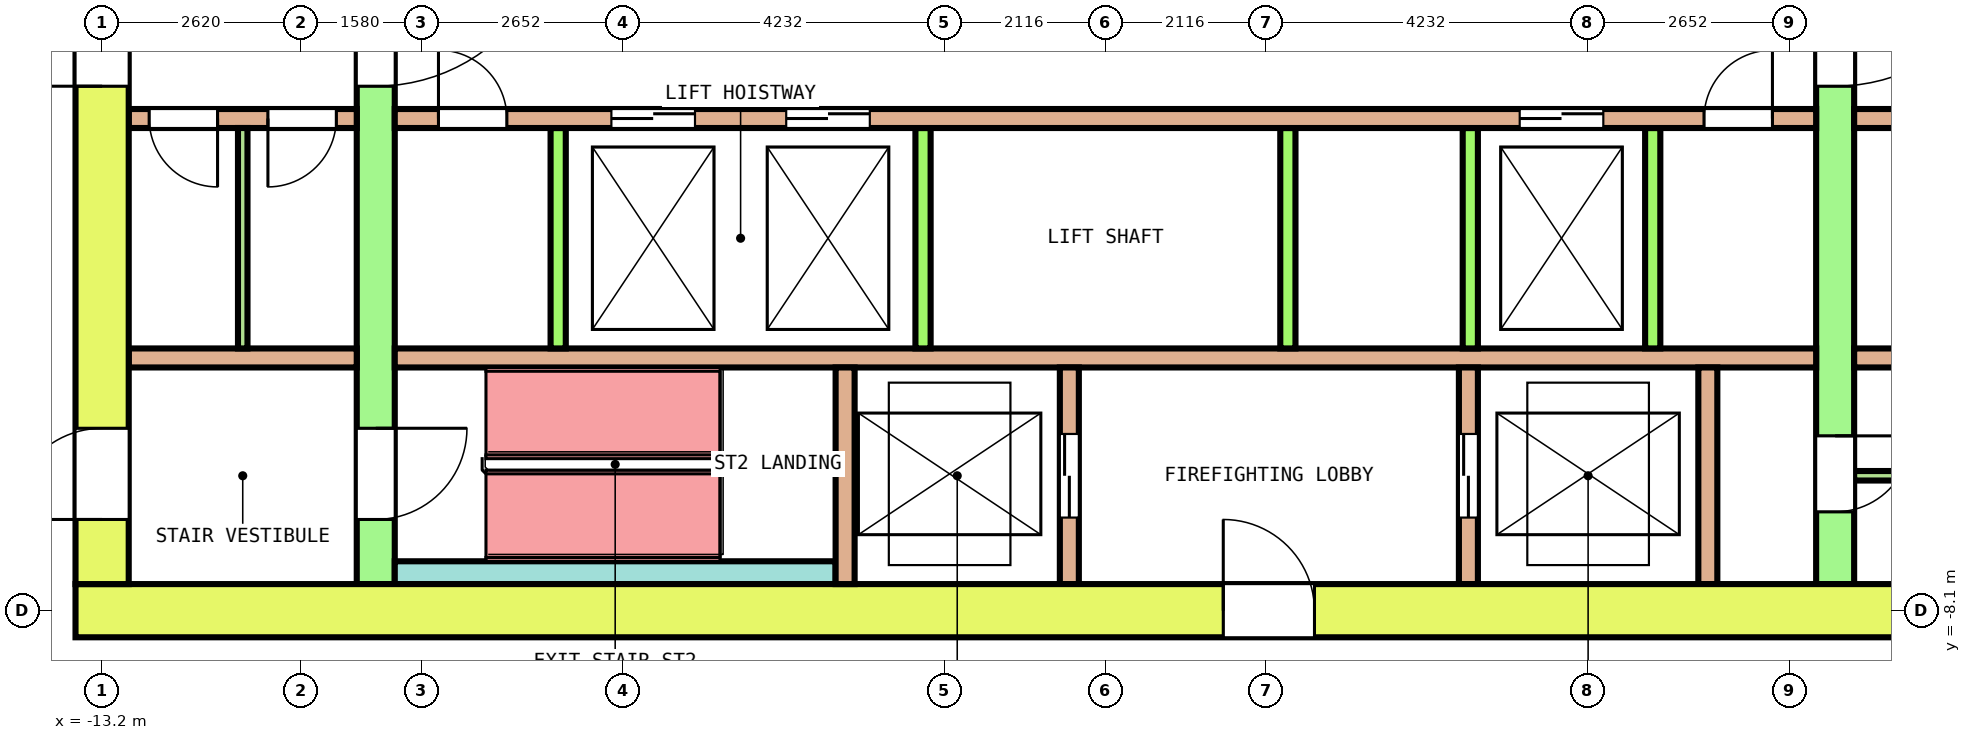
"""IFC4 building model, lengths in metres.
Left out: names, types, materials, properties, quantities, classifications, styles, units other than length and angle.
Written with IfcOpenShell. Run it as: python <this file> out.ifc"""

import sys

from ifc_helpers import new_model, si_unit, direction, frame, frame_2d, origin, place, context, subcontext, project, spatial, rectangle, extrude, element, fill, save


model = new_model("IFC4")
c1 = context("Model", 3, precision=1e-05, world=origin(), true_north=direction((0.0, 1.0)))
c2 = subcontext(c1, "Body", "Model", "MODEL_VIEW")
j1 = project(units=[si_unit("LENGTHUNIT", "METRE"), si_unit("PLANEANGLEUNIT", "RADIAN")], contexts=[c1])
p1 = place(None, origin())
s1 = spatial("IfcSite", under=j1, at=p1, CompositionType="ELEMENT")
p2 = place(p1, origin())
s2 = spatial("IfcBuilding", under=s1, at=p2, CompositionType="ELEMENT")
p3 = place(p2, frame((0.0, 0.0, 145.2)))
s3 = spatial("IfcBuildingStorey", under=s2, at=p3, CompositionType="ELEMENT", Elevation=145.2)
p4 = place(p3, frame((-13.55, -8.1, 0.0), z_axis=(0.0, 0.0, 1.0), x_axis=(1.0, 0.0, 0.0)))
e1 = element("IfcWall", 1, at=p4, inside=s3, PredefinedType="SHEAR", context=c2, shape_type="SweptSolid", body=[
    extrude(rectangle(XDim=27.1, YDim=0.7, at=frame_2d((13.55, 0.0))), origin(), (0.0, 0.0, 1.0), 4.1),
])
p5 = place(p4, frame((15.1, 0.0, 0.0)))
e2 = element("IfcOpeningElement", 2, at=p5, cuts=e1, PredefinedType="OPENING", context=c2, shape_type="SweptSolid", body=[
    extrude(rectangle(XDim=1.2, YDim=2.1, at=frame_2d((0.6, 1.05))), frame((0.0, 0.36, 0.0), z_axis=(0.0, -1.0, 0.0), x_axis=(1.0, 0.0, 0.0)), (0.0, 0.0, 1.0), 0.72),
])
p6 = place(p3, frame((-13.2, -7.75, 0.0), z_axis=(0.0, 0.0, 1.0), x_axis=(0.0, 1.0, 0.0)))
e3 = element("IfcWall", 3, at=p6, inside=s3, PredefinedType="SHEAR", context=c2, shape_type="SweptSolid", body=[
    extrude(rectangle(XDim=15.5, YDim=0.7, at=frame_2d((7.75, 0.0))), origin(), (0.0, 0.0, 1.0), 4.1),
])
p7 = place(p6, frame((6.55, 0.0, 0.0)))
e4 = element("IfcOpeningElement", 4, at=p7, cuts=e3, PredefinedType="OPENING", context=c2, shape_type="SweptSolid", body=[
    extrude(rectangle(XDim=2.4, YDim=2.1, at=frame_2d((1.2, 1.05))), frame((0.0, 0.36, 0.0), z_axis=(0.0, -1.0, 0.0), x_axis=(1.0, 0.0, 0.0)), (0.0, 0.0, 1.0), 0.72),
])
p8 = place(p6, frame((13.45, 0.0, 0.0)))
e5 = element("IfcOpeningElement", 5, at=p8, cuts=e3, PredefinedType="OPENING", context=c2, shape_type="SweptSolid", body=[
    extrude(rectangle(XDim=1.2, YDim=2.1, at=frame_2d((0.6, 1.05))), frame((0.0, 0.36, 0.0), z_axis=(0.0, -1.0, 0.0), x_axis=(1.0, 0.0, 0.0)), (0.0, 0.0, 1.0), 0.72),
])
p9 = place(p6, frame((0.85, 0.0, 0.0)))
e6 = element("IfcOpeningElement", 6, at=p9, cuts=e3, PredefinedType="OPENING", context=c2, shape_type="SweptSolid", body=[
    extrude(rectangle(XDim=1.2, YDim=2.1, at=frame_2d((0.6, 1.05))), frame((0.0, 0.36, 0.0), z_axis=(0.0, -1.0, 0.0), x_axis=(1.0, 0.0, 0.0)), (0.0, 0.0, 1.0), 0.72),
])
p10 = place(p3, frame((-9.6, -7.75, 0.0), z_axis=(0.0, 0.0, 1.0), x_axis=(0.0, 1.0, 0.0)))
e7 = element("IfcWall", 7, at=p10, inside=s3, PredefinedType="SHEAR", context=c2, shape_type="SweptSolid", body=[
    extrude(rectangle(XDim=15.5, YDim=0.5, at=frame_2d((7.75, 0.0))), origin(), (0.0, 0.0, 1.0), 4.1),
])
p11 = place(p10, frame((6.55, 0.0, 0.0)))
e8 = element("IfcOpeningElement", 8, at=p11, cuts=e7, PredefinedType="OPENING", context=c2, shape_type="SweptSolid", body=[
    extrude(rectangle(XDim=2.4, YDim=2.1, at=frame_2d((1.2, 1.05))), frame((0.0, 0.26, 0.0), z_axis=(0.0, -1.0, 0.0), x_axis=(1.0, 0.0, 0.0)), (0.0, 0.0, 1.0), 0.52),
])
p12 = place(p10, frame((13.45, 0.0, 0.0)))
e9 = element("IfcOpeningElement", 9, at=p12, cuts=e7, PredefinedType="OPENING", context=c2, shape_type="SweptSolid", body=[
    extrude(rectangle(XDim=1.2, YDim=2.1, at=frame_2d((0.6, 1.05))), frame((0.0, 0.26, 0.0), z_axis=(0.0, -1.0, 0.0), x_axis=(1.0, 0.0, 0.0)), (0.0, 0.0, 1.0), 0.52),
])
p13 = place(p10, frame((0.85, 0.0, 0.0)))
e10 = element("IfcOpeningElement", 10, at=p13, cuts=e7, PredefinedType="OPENING", context=c2, shape_type="SweptSolid", body=[
    extrude(rectangle(XDim=1.2, YDim=2.1, at=frame_2d((0.6, 1.05))), frame((0.0, 0.26, 0.0), z_axis=(0.0, -1.0, 0.0), x_axis=(1.0, 0.0, 0.0)), (0.0, 0.0, 1.0), 0.52),
])
p14 = place(p3, frame((9.6, -7.75, 0.0), z_axis=(0.0, 0.0, 1.0), x_axis=(0.0, 1.0, 0.0)))
e11 = element("IfcWall", 11, at=p14, inside=s3, PredefinedType="SHEAR", context=c2, shape_type="SweptSolid", body=[
    extrude(rectangle(XDim=15.5, YDim=0.5, at=frame_2d((7.75, 0.0))), origin(), (0.0, 0.0, 1.0), 4.1),
])
p15 = place(p14, frame((6.55, 0.0, 0.0)))
e12 = element("IfcOpeningElement", 12, at=p15, cuts=e11, PredefinedType="OPENING", context=c2, shape_type="SweptSolid", body=[
    extrude(rectangle(XDim=2.4, YDim=2.1, at=frame_2d((1.2, 1.05))), frame((0.0, 0.26, 0.0), z_axis=(0.0, -1.0, 0.0), x_axis=(1.0, 0.0, 0.0)), (0.0, 0.0, 1.0), 0.52),
])
p16 = place(p14, frame((13.45, 0.0, 0.0)))
e13 = element("IfcOpeningElement", 13, at=p16, cuts=e11, PredefinedType="OPENING", context=c2, shape_type="SweptSolid", body=[
    extrude(rectangle(XDim=1.2, YDim=2.1, at=frame_2d((0.6, 1.05))), frame((0.0, 0.26, 0.0), z_axis=(0.0, -1.0, 0.0), x_axis=(1.0, 0.0, 0.0)), (0.0, 0.0, 1.0), 0.52),
])
p17 = place(p14, frame((0.95, 0.0, 0.0)))
e14 = element("IfcOpeningElement", 14, at=p17, cuts=e11, PredefinedType="OPENING", context=c2, shape_type="SweptSolid", body=[
    extrude(rectangle(XDim=1.0, YDim=2.1, at=frame_2d((0.5, 1.05))), frame((0.0, 0.26, 0.0), z_axis=(0.0, -1.0, 0.0), x_axis=(1.0, 0.0, 0.0)), (0.0, 0.0, 1.0), 0.52),
])
p18 = place(p3, frame((-12.85, -1.625, 0.0), z_axis=(0.0, 0.0, 1.0), x_axis=(1.0, 0.0, 0.0)))
e15 = element("IfcWall", 15, at=p18, inside=s3, PredefinedType="SOLIDWALL", context=c2, shape_type="SweptSolid", body=[
    extrude(rectangle(XDim=3.0, YDim=0.25, at=frame_2d((1.5, 0.0))), origin(), (0.0, 0.0, 1.0), 4.1),
])
p19 = place(p18, frame((0.269, 0.0, 0.0)))
e16 = element("IfcOpeningElement", 16, at=p19, cuts=e15, PredefinedType="OPENING", context=c2, shape_type="SweptSolid", body=[
    extrude(rectangle(XDim=0.9, YDim=2.1, at=frame_2d((0.45, 1.05))), frame((0.0, 0.135, 0.0), z_axis=(0.0, -1.0, 0.0), x_axis=(1.0, 0.0, 0.0)), (0.0, 0.0, 1.0), 0.27),
])
p20 = place(p18, frame((1.831, 0.0, 0.0)))
e17 = element("IfcOpeningElement", 17, at=p20, cuts=e15, PredefinedType="OPENING", context=c2, shape_type="SweptSolid", body=[
    extrude(rectangle(XDim=0.9, YDim=2.1, at=frame_2d((0.45, 1.05))), frame((0.0, 0.135, 0.0), z_axis=(0.0, -1.0, 0.0), x_axis=(1.0, 0.0, 0.0)), (0.0, 0.0, 1.0), 0.27),
])
p21 = place(p3, frame((-9.35, -1.625, 0.0), z_axis=(0.0, 0.0, 1.0), x_axis=(1.0, 0.0, 0.0)))
e18 = element("IfcWall", 18, at=p21, inside=s3, PredefinedType="SOLIDWALL", context=c2, shape_type="SweptSolid", body=[
    extrude(rectangle(XDim=18.7, YDim=0.25, at=frame_2d((9.35, 0.0))), origin(), (0.0, 0.0, 1.0), 4.1),
])
p22 = place(p21, frame((2.85, 0.0, 0.0)))
e19 = element("IfcOpeningElement", 19, at=p22, cuts=e18, PredefinedType="OPENING", context=c2, shape_type="SweptSolid", body=[
    extrude(rectangle(XDim=1.1, YDim=2.1, at=frame_2d((0.55, 1.05))), frame((0.0, 0.135, 0.0), z_axis=(0.0, -1.0, 0.0), x_axis=(1.0, 0.0, 0.0)), (0.0, 0.0, 1.0), 0.27),
])
p23 = place(p21, frame((5.15, 0.0, 0.0)))
e20 = element("IfcOpeningElement", 20, at=p23, cuts=e18, PredefinedType="OPENING", context=c2, shape_type="SweptSolid", body=[
    extrude(rectangle(XDim=1.1, YDim=2.1, at=frame_2d((0.55, 1.05))), frame((0.0, 0.135, 0.0), z_axis=(0.0, -1.0, 0.0), x_axis=(1.0, 0.0, 0.0)), (0.0, 0.0, 1.0), 0.27),
])
p24 = place(p21, frame((14.8, 0.0, 0.0)))
e21 = element("IfcOpeningElement", 21, at=p24, cuts=e18, PredefinedType="OPENING", context=c2, shape_type="SweptSolid", body=[
    extrude(rectangle(XDim=1.1, YDim=2.1, at=frame_2d((0.55, 1.05))), frame((0.0, 0.135, 0.0), z_axis=(0.0, -1.0, 0.0), x_axis=(1.0, 0.0, 0.0)), (0.0, 0.0, 1.0), 0.27),
])
p25 = place(p21, frame((0.575, 0.0, 0.0)))
e22 = element("IfcOpeningElement", 22, at=p25, cuts=e18, PredefinedType="OPENING", context=c2, shape_type="SweptSolid", body=[
    extrude(rectangle(XDim=0.9, YDim=2.1, at=frame_2d((0.45, 1.05))), frame((0.0, 0.135, 0.0), z_axis=(0.0, -1.0, 0.0), x_axis=(1.0, 0.0, 0.0)), (0.0, 0.0, 1.0), 0.27),
])
p26 = place(p21, frame((17.225, 0.0, 0.0)))
e23 = element("IfcOpeningElement", 23, at=p26, cuts=e18, PredefinedType="OPENING", context=c2, shape_type="SweptSolid", body=[
    extrude(rectangle(XDim=0.9, YDim=2.1, at=frame_2d((0.45, 1.05))), frame((0.0, 0.135, 0.0), z_axis=(0.0, -1.0, 0.0), x_axis=(1.0, 0.0, 0.0)), (0.0, 0.0, 1.0), 0.27),
])
p27 = place(p3, frame((9.85, -1.625, 0.0), z_axis=(0.0, 0.0, 1.0), x_axis=(1.0, 0.0, 0.0)))
e24 = element("IfcWall", 24, at=p27, inside=s3, PredefinedType="SOLIDWALL", context=c2, shape_type="SweptSolid", body=[
    extrude(rectangle(XDim=3.0, YDim=0.25, at=frame_2d((1.5, 0.0))), origin(), (0.0, 0.0, 1.0), 4.1),
])
p28 = place(p27, frame((1.05, 0.0, 0.0)))
e25 = element("IfcOpeningElement", 25, at=p28, cuts=e24, PredefinedType="OPENING", context=c2, shape_type="SweptSolid", body=[
    extrude(rectangle(XDim=0.9, YDim=2.1, at=frame_2d((0.45, 1.05))), frame((0.0, 0.135, 0.0), z_axis=(0.0, -1.0, 0.0), x_axis=(1.0, 0.0, 0.0)), (0.0, 0.0, 1.0), 0.27),
])
p29 = place(p3, frame((-12.85, -4.775, 0.0), z_axis=(0.0, 0.0, 1.0), x_axis=(1.0, 0.0, 0.0)))
e26 = element("IfcWall", 26, at=p29, inside=s3, PredefinedType="SOLIDWALL", context=c2, shape_type="SweptSolid", body=[
    extrude(rectangle(XDim=3.0, YDim=0.25, at=frame_2d((1.5, 0.0))), origin(), (0.0, 0.0, 1.0), 4.1),
])
p30 = place(p3, frame((-9.35, -4.775, 0.0), z_axis=(0.0, 0.0, 1.0), x_axis=(1.0, 0.0, 0.0)))
e27 = element("IfcWall", 27, at=p30, inside=s3, PredefinedType="SOLIDWALL", context=c2, shape_type="SweptSolid", body=[
    extrude(rectangle(XDim=18.7, YDim=0.25, at=frame_2d((9.35, 0.0))), origin(), (0.0, 0.0, 1.0), 4.1),
])
p31 = place(p3, frame((9.85, -4.775, 0.0), z_axis=(0.0, 0.0, 1.0), x_axis=(1.0, 0.0, 0.0)))
e28 = element("IfcWall", 28, at=p31, inside=s3, PredefinedType="SOLIDWALL", context=c2, shape_type="SweptSolid", body=[
    extrude(rectangle(XDim=3.0, YDim=0.25, at=frame_2d((1.5, 0.0))), origin(), (0.0, 0.0, 1.0), 4.1),
])
for number, where, z_axis, x_axis in (
    (29, (-7.2, -4.65, 0.0), (0.0, 0.0, 1.0), (0.0, 1.0, 0.0)),
    (30, (-2.4, -4.65, 0.0), (0.0, 0.0, 1.0), (0.0, 1.0, 0.0)),
    (31, (2.4, -4.65, 0.0), (0.0, 0.0, 1.0), (0.0, 1.0, 0.0)),
    (32, (4.8, -4.65, 0.0), (0.0, 0.0, 1.0), (0.0, 1.0, 0.0)),
    (33, (7.2, -4.65, 0.0), (0.0, 0.0, 1.0), (0.0, 1.0, 0.0)),
):
    element("IfcWall", number, at=place(p3, frame(where, z_axis=z_axis, x_axis=x_axis)), inside=s3, PredefinedType="SOLIDWALL", context=c2, shape_type="SweptSolid", body=[
        extrude(rectangle(XDim=2.9, YDim=0.2, at=frame_2d((1.45, 0.0))), origin(), (0.0, 0.0, 1.0), 4.1),
    ])
p32 = place(p3, frame((-9.35, -7.6, 0.0), z_axis=(0.0, 0.0, 1.0), x_axis=(1.0, 0.0, 0.0)))
e34 = element("IfcWall", 34, at=p32, inside=s3, PredefinedType="SOLIDWALL", context=c2, shape_type="SweptSolid", body=[
    extrude(rectangle(XDim=5.8, YDim=0.3, at=frame_2d((2.9, 0.0))), origin(), (0.0, 0.0, 1.0), 4.1),
])
p33 = place(p3, frame((-3.425, -7.75, 0.0), z_axis=(0.0, 0.0, 1.0), x_axis=(0.0, 1.0, 0.0)))
e35 = element("IfcWall", 35, at=p33, inside=s3, PredefinedType="SOLIDWALL", context=c2, shape_type="SweptSolid", body=[
    extrude(rectangle(XDim=2.85, YDim=0.25, at=frame_2d((1.425, 0.0))), origin(), (0.0, 0.0, 1.0), 4.1),
])
p34 = place(p3, frame((-0.475, -7.75, 0.0), z_axis=(0.0, 0.0, 1.0), x_axis=(0.0, 1.0, 0.0)))
e36 = element("IfcWall", 36, at=p34, inside=s3, PredefinedType="SOLIDWALL", context=c2, shape_type="SweptSolid", body=[
    extrude(rectangle(XDim=2.85, YDim=0.25, at=frame_2d((1.425, 0.0))), origin(), (0.0, 0.0, 1.0), 4.1),
])
p35 = place(p34, frame((0.875, 0.0, 0.0)))
e37 = element("IfcOpeningElement", 37, at=p35, cuts=e36, PredefinedType="OPENING", context=c2, shape_type="SweptSolid", body=[
    extrude(rectangle(XDim=1.1, YDim=2.1, at=frame_2d((0.55, 1.05))), frame((0.0, 0.135, 0.0), z_axis=(0.0, -1.0, 0.0), x_axis=(1.0, 0.0, 0.0)), (0.0, 0.0, 1.0), 0.27),
])
p36 = place(p3, frame((4.775, -7.75, 0.0), z_axis=(0.0, 0.0, 1.0), x_axis=(0.0, 1.0, 0.0)))
e38 = element("IfcWall", 38, at=p36, inside=s3, PredefinedType="SOLIDWALL", context=c2, shape_type="SweptSolid", body=[
    extrude(rectangle(XDim=2.85, YDim=0.25, at=frame_2d((1.425, 0.0))), origin(), (0.0, 0.0, 1.0), 4.1),
])
p37 = place(p36, frame((0.875, 0.0, 0.0)))
e39 = element("IfcOpeningElement", 39, at=p37, cuts=e38, PredefinedType="OPENING", context=c2, shape_type="SweptSolid", body=[
    extrude(rectangle(XDim=1.1, YDim=2.1, at=frame_2d((0.55, 1.05))), frame((0.0, 0.135, 0.0), z_axis=(0.0, -1.0, 0.0), x_axis=(1.0, 0.0, 0.0)), (0.0, 0.0, 1.0), 0.27),
])
p38 = place(p3, frame((7.925, -7.75, 0.0), z_axis=(0.0, 0.0, 1.0), x_axis=(0.0, 1.0, 0.0)))
e40 = element("IfcWall", 40, at=p38, inside=s3, PredefinedType="SOLIDWALL", context=c2, shape_type="SweptSolid", body=[
    extrude(rectangle(XDim=2.85, YDim=0.25, at=frame_2d((1.425, 0.0))), origin(), (0.0, 0.0, 1.0), 4.1),
])
p39 = place(p3, frame((9.85, -6.325, 0.0), z_axis=(0.0, 0.0, 1.0), x_axis=(1.0, 0.0, 0.0)))
e41 = element("IfcWall", 41, at=p39, inside=s3, PredefinedType="PARTITIONING", context=c2, shape_type="SweptSolid", body=[
    extrude(rectangle(XDim=3.0, YDim=0.125, at=frame_2d((1.5, 0.0))), origin(), (0.0, 0.0, 1.0), 4.1),
])
p40 = place(p3, frame((-11.35, -4.65, 0.0), z_axis=(0.0, 0.0, 1.0), x_axis=(0.0, 1.0, 0.0)))
e42 = element("IfcWall", 42, at=p40, inside=s3, PredefinedType="PARTITIONING", context=c2, shape_type="SweptSolid", body=[
    extrude(rectangle(XDim=2.9, YDim=0.125, at=frame_2d((1.45, 0.0))), origin(), (0.0, 0.0, 1.0), 4.1),
])
p41 = place(p22, origin())
e43 = element("IfcDoor", 43, at=p41, inside=s3, OperationType="DOUBLE_DOOR_SLIDING", PredefinedType="DOOR", context=c2, shape_type="SweptSolid", body=[
    extrude(rectangle(XDim=1.1, YDim=2.1, at=frame_2d((0.55, 1.05))), frame((0.0, 0.075, 0.0), z_axis=(0.0, -1.0, 0.0), x_axis=(1.0, 0.0, 0.0)), (0.0, 0.0, 1.0), 0.15),
])
fill(e19, e43)
p42 = place(p23, origin())
e44 = element("IfcDoor", 44, at=p42, inside=s3, OperationType="DOUBLE_DOOR_SLIDING", PredefinedType="DOOR", context=c2, shape_type="SweptSolid", body=[
    extrude(rectangle(XDim=1.1, YDim=2.1, at=frame_2d((0.55, 1.05))), frame((0.0, 0.075, 0.0), z_axis=(0.0, -1.0, 0.0), x_axis=(1.0, 0.0, 0.0)), (0.0, 0.0, 1.0), 0.15),
])
fill(e20, e44)
p43 = place(p24, origin())
e45 = element("IfcDoor", 45, at=p43, inside=s3, OperationType="DOUBLE_DOOR_SLIDING", PredefinedType="DOOR", context=c2, shape_type="SweptSolid", body=[
    extrude(rectangle(XDim=1.1, YDim=2.1, at=frame_2d((0.55, 1.05))), frame((0.0, 0.075, 0.0), z_axis=(0.0, -1.0, 0.0), x_axis=(1.0, 0.0, 0.0)), (0.0, 0.0, 1.0), 0.15),
])
fill(e21, e45)
p44 = place(p35, origin())
e46 = element("IfcDoor", 46, at=p44, inside=s3, OperationType="DOUBLE_DOOR_SLIDING", PredefinedType="DOOR", context=c2, shape_type="SweptSolid", body=[
    extrude(rectangle(XDim=1.1, YDim=2.1, at=frame_2d((0.55, 1.05))), frame((0.0, 0.075, 0.0), z_axis=(0.0, -1.0, 0.0), x_axis=(1.0, 0.0, 0.0)), (0.0, 0.0, 1.0), 0.15),
])
fill(e37, e46)
p45 = place(p37, origin())
e47 = element("IfcDoor", 47, at=p45, inside=s3, OperationType="DOUBLE_DOOR_SLIDING", PredefinedType="DOOR", context=c2, shape_type="SweptSolid", body=[
    extrude(rectangle(XDim=1.1, YDim=2.1, at=frame_2d((0.55, 1.05))), frame((0.0, 0.075, 0.0), z_axis=(0.0, -1.0, 0.0), x_axis=(1.0, 0.0, 0.0)), (0.0, 0.0, 1.0), 0.15),
])
fill(e39, e47)
p46 = place(p11, origin())
e48 = element("IfcDoor", 48, at=p46, inside=s3, OperationType="DOUBLE_DOOR_SINGLE_SWING", PredefinedType="DOOR", context=c2, shape_type="SweptSolid", body=[
    extrude(rectangle(XDim=2.4, YDim=2.1, at=frame_2d((1.2, 1.05))), frame((0.0, 0.2, 0.0), z_axis=(0.0, -1.0, 0.0), x_axis=(1.0, 0.0, 0.0)), (0.0, 0.0, 1.0), 0.4),
])
fill(e8, e48)
p47 = place(p15, origin())
e49 = element("IfcDoor", 49, at=p47, inside=s3, OperationType="DOUBLE_DOOR_SINGLE_SWING", PredefinedType="DOOR", context=c2, shape_type="SweptSolid", body=[
    extrude(rectangle(XDim=2.4, YDim=2.1, at=frame_2d((1.2, 1.05))), frame((0.0, 0.2, 0.0), z_axis=(0.0, -1.0, 0.0), x_axis=(1.0, 0.0, 0.0)), (0.0, 0.0, 1.0), 0.4),
])
fill(e12, e49)
p48 = place(p7, origin())
e50 = element("IfcDoor", 50, at=p48, inside=s3, OperationType="DOUBLE_DOOR_SINGLE_SWING", PredefinedType="DOOR", context=c2, shape_type="SweptSolid", body=[
    extrude(rectangle(XDim=2.4, YDim=2.1, at=frame_2d((1.2, 1.05))), frame((0.0, 0.3, 0.0), z_axis=(0.0, -1.0, 0.0), x_axis=(1.0, 0.0, 0.0)), (0.0, 0.0, 1.0), 0.6),
])
fill(e4, e50)
p49 = place(p13, origin())
e51 = element("IfcDoor", 51, at=p49, inside=s3, OperationType="SINGLE_SWING_RIGHT", PredefinedType="DOOR", context=c2, shape_type="SweptSolid", body=[
    extrude(rectangle(XDim=1.2, YDim=2.1, at=frame_2d((0.6, 1.05))), frame((0.0, 0.2, 0.0), z_axis=(0.0, -1.0, 0.0), x_axis=(1.0, 0.0, 0.0)), (0.0, 0.0, 1.0), 0.4),
])
fill(e10, e51)
p50 = place(p9, origin())
e52 = element("IfcDoor", 52, at=p50, inside=s3, OperationType="SINGLE_SWING_LEFT", PredefinedType="DOOR", context=c2, shape_type="SweptSolid", body=[
    extrude(rectangle(XDim=1.2, YDim=2.1, at=frame_2d((0.6, 1.05))), frame((0.0, 0.3, 0.0), z_axis=(0.0, -1.0, 0.0), x_axis=(1.0, 0.0, 0.0)), (0.0, 0.0, 1.0), 0.6),
])
fill(e6, e52)
p51 = place(p5, origin())
e53 = element("IfcDoor", 53, at=p51, inside=s3, OperationType="SINGLE_SWING_RIGHT", PredefinedType="DOOR", context=c2, shape_type="SweptSolid", body=[
    extrude(rectangle(XDim=1.2, YDim=2.1, at=frame_2d((0.6, 1.05))), frame((0.0, 0.3, 0.0), z_axis=(0.0, -1.0, 0.0), x_axis=(1.0, 0.0, 0.0)), (0.0, 0.0, 1.0), 0.6),
])
fill(e2, e53)
p52 = place(p17, origin())
e54 = element("IfcDoor", 54, at=p52, inside=s3, OperationType="SINGLE_SWING_RIGHT", PredefinedType="DOOR", context=c2, shape_type="SweptSolid", body=[
    extrude(rectangle(XDim=1.0, YDim=2.1, at=frame_2d((0.5, 1.05))), frame((0.0, 0.2, 0.0), z_axis=(0.0, -1.0, 0.0), x_axis=(1.0, 0.0, 0.0)), (0.0, 0.0, 1.0), 0.4),
])
fill(e14, e54)
p53 = place(p19, origin())
e55 = element("IfcDoor", 55, at=p53, inside=s3, OperationType="SINGLE_SWING_RIGHT", PredefinedType="DOOR", context=c2, shape_type="SweptSolid", body=[
    extrude(rectangle(XDim=0.9, YDim=2.1, at=frame_2d((0.45, 1.05))), frame((0.0, 0.075, 0.0), z_axis=(0.0, -1.0, 0.0), x_axis=(1.0, 0.0, 0.0)), (0.0, 0.0, 1.0), 0.15),
])
fill(e16, e55)
p54 = place(p20, origin())
e56 = element("IfcDoor", 56, at=p54, inside=s3, OperationType="SINGLE_SWING_LEFT", PredefinedType="DOOR", context=c2, shape_type="SweptSolid", body=[
    extrude(rectangle(XDim=0.9, YDim=2.1, at=frame_2d((0.45, 1.05))), frame((0.0, 0.075, 0.0), z_axis=(0.0, -1.0, 0.0), x_axis=(1.0, 0.0, 0.0)), (0.0, 0.0, 1.0), 0.15),
])
fill(e17, e56)
p55 = place(p25, origin())
e57 = element("IfcDoor", 57, at=p55, inside=s3, OperationType="SINGLE_SWING_RIGHT", PredefinedType="DOOR", context=c2, shape_type="SweptSolid", body=[
    extrude(rectangle(XDim=0.9, YDim=2.1, at=frame_2d((0.45, 1.05))), frame((0.0, 0.075, 0.0), z_axis=(0.0, -1.0, 0.0), x_axis=(1.0, 0.0, 0.0)), (0.0, 0.0, 1.0), 0.15),
])
fill(e22, e57)
p56 = place(p26, origin())
e58 = element("IfcDoor", 58, at=p56, inside=s3, OperationType="SINGLE_SWING_LEFT", PredefinedType="DOOR", context=c2, shape_type="SweptSolid", body=[
    extrude(rectangle(XDim=0.9, YDim=2.1, at=frame_2d((0.45, 1.05))), frame((0.0, 0.075, 0.0), z_axis=(0.0, -1.0, 0.0), x_axis=(1.0, 0.0, 0.0)), (0.0, 0.0, 1.0), 0.15),
])
fill(e23, e58)
save(model, sys.argv[1])
